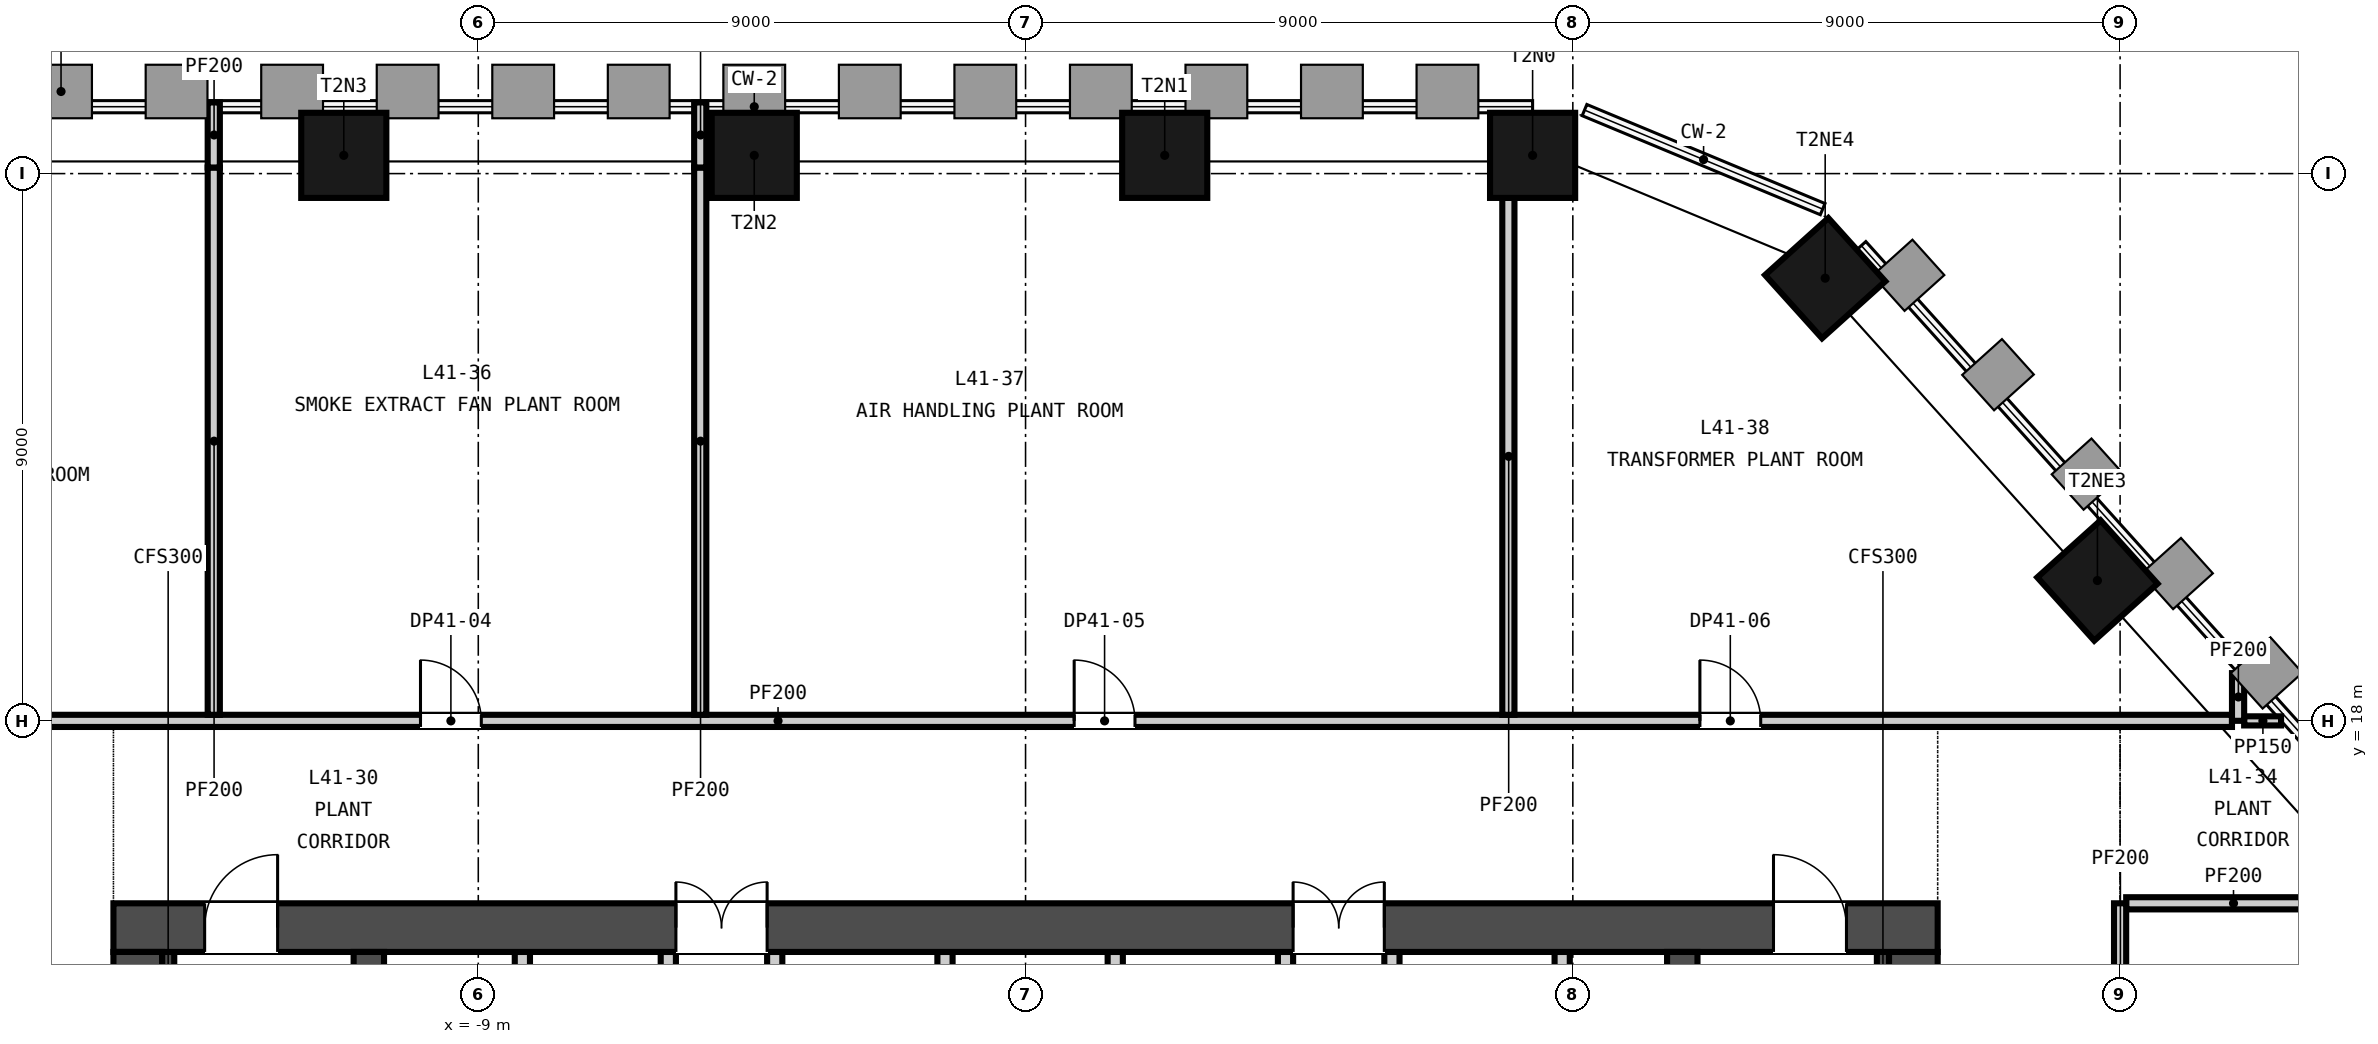
"""IFC4 building model, lengths in metres.
Left out: names, types, materials, properties, quantities, classifications, styles, units other than length and angle.
Written with IfcOpenShell. Run it as: python <this file> out.ifc"""

import sys

from ifc_helpers import new_model, si_unit, direction, frame, frame_2d, origin, origin_2d, place, context, subcontext, project, spatial, rectangle, extrude, element, fill, save


model = new_model("IFC4")
c1 = context("Model", 3, precision=1e-05, world=origin(), true_north=direction((0.0, 1.0)))
c2 = subcontext(c1, "Body", "Model", "MODEL_VIEW")
j1 = project(units=[si_unit("LENGTHUNIT", "METRE"), si_unit("PLANEANGLEUNIT", "RADIAN")], contexts=[c1])
p1 = place(None, origin())
s1 = spatial("IfcSite", under=j1, at=p1, CompositionType="ELEMENT")
p2 = place(p1, origin())
s2 = spatial("IfcBuilding", under=s1, at=p2, CompositionType="ELEMENT")
p3 = place(p2, frame((0.0, 0.0, 166.3)))
s3 = spatial("IfcBuildingStorey", under=s2, at=p3, CompositionType="ELEMENT", Elevation=166.3)
p4 = place(p3, frame((-15.0, 14.6, -0.3), z_axis=(0.0, 0.0, 1.0), x_axis=(1.0, 0.0, 0.0)))
e1 = element("IfcWall", 1, at=p4, inside=s3, PredefinedType="SOLIDWALL", context=c2, shape_type="SweptSolid", body=[
    extrude(rectangle(XDim=30.0, YDim=0.8, at=frame_2d((15.0, 0.0))), origin(), (0.0, 0.0, 1.0), 4.65),
])
p5 = place(p4, frame((9.25, 0.0, 0.3)))
e2 = element("IfcOpeningElement", 2, at=p5, cuts=e1, PredefinedType="OPENING", context=c2, shape_type="SweptSolid", body=[
    extrude(rectangle(XDim=1.5, YDim=2.1, at=frame_2d((0.75, 1.05))), frame((0.0, 0.41, 0.0), z_axis=(0.0, -1.0, 0.0), x_axis=(1.0, 0.0, 0.0)), (0.0, 0.0, 1.0), 0.82),
])
p6 = place(p4, frame((19.4, 0.0, 0.3)))
e3 = element("IfcOpeningElement", 3, at=p6, cuts=e1, PredefinedType="OPENING", context=c2, shape_type="SweptSolid", body=[
    extrude(rectangle(XDim=1.5, YDim=2.1, at=frame_2d((0.75, 1.05))), frame((0.0, 0.41, 0.0), z_axis=(0.0, -1.0, 0.0), x_axis=(1.0, 0.0, 0.0)), (0.0, 0.0, 1.0), 0.82),
])
p7 = place(p4, frame((1.5, 0.0, 0.3)))
e4 = element("IfcOpeningElement", 4, at=p7, cuts=e1, PredefinedType="OPENING", context=c2, shape_type="SweptSolid", body=[
    extrude(rectangle(XDim=1.2, YDim=2.1, at=frame_2d((0.6, 1.05))), frame((0.0, 0.41, 0.0), z_axis=(0.0, -1.0, 0.0), x_axis=(1.0, 0.0, 0.0)), (0.0, 0.0, 1.0), 0.82),
])
p8 = place(p4, frame((27.3, 0.0, 0.3)))
e5 = element("IfcOpeningElement", 5, at=p8, cuts=e1, PredefinedType="OPENING", context=c2, shape_type="SweptSolid", body=[
    extrude(rectangle(XDim=1.2, YDim=2.1, at=frame_2d((0.6, 1.05))), frame((0.0, 0.41, 0.0), z_axis=(0.0, -1.0, 0.0), x_axis=(1.0, 0.0, 0.0)), (0.0, 0.0, 1.0), 0.82),
])
for number, where, z_axis, x_axis in (
    (6, (-14.6, 0.8, -0.3), (0.0, 0.0, 1.0), (0.0, 1.0, 0.0)),
    (7, (14.6, 0.8, -0.3), (0.0, 0.0, 1.0), (0.0, 1.0, 0.0)),
):
    element("IfcWall", number, at=place(p3, frame(where, z_axis=z_axis, x_axis=x_axis)), inside=s3, PredefinedType="SOLIDWALL", context=c2, shape_type="SweptSolid", body=[
        extrude(rectangle(XDim=13.4, YDim=0.8, at=frame_2d((6.7, 0.0))), origin(), (0.0, 0.0, 1.0), 4.65),
    ])
for number, where, z_axis, x_axis in (
    (8, (-10.8, 0.8, -0.3), (0.0, 0.0, 1.0), (0.0, 1.0, 0.0)),
    (9, (10.8, 0.8, -0.3), (0.0, 0.0, 1.0), (0.0, 1.0, 0.0)),
):
    element("IfcWall", number, at=place(p3, frame(where, z_axis=z_axis, x_axis=x_axis)), inside=s3, PredefinedType="SOLIDWALL", context=c2, shape_type="SweptSolid", body=[
        extrude(rectangle(XDim=13.4, YDim=0.5, at=frame_2d((6.7, 0.0))), origin(), (0.0, 0.0, 1.0), 4.65),
    ])
for number, where, z_axis, x_axis in (
    (10, (8.339, 27.3, -0.3), (0.0, 0.0, 1.0), (-1.0, 0.0, 0.0)),
    (11, (2.288, 27.3, -0.3), (0.0, 0.0, 1.0), (-1.0, 0.0, 0.0)),
    (12, (-4.462, 27.3, -0.3), (0.0, 0.0, 1.0), (-1.0, 0.0, 0.0)),
    (13, (-11.212, 27.3, -0.3), (0.0, 0.0, 1.0), (-1.0, 0.0, 0.0)),
    (14, (17.627, 20.308, -0.3), (0.0, 0.0, 1.0), (-0.669, 0.743, 0.0)),
    (15, (13.15, 25.28, -0.3), (0.0, 0.0, 1.0), (-0.669, 0.743, 0.0)),
):
    element("IfcColumn", number, at=place(p3, frame(where, z_axis=z_axis, x_axis=x_axis)), inside=s3, PredefinedType="COLUMN", context=c2, shape_type="SweptSolid", body=[
        extrude(rectangle(XDim=1.4, YDim=1.4, at=origin_2d()), origin(), (0.0, 0.0, 1.0), 4.65),
    ])
for number, where, z_axis, x_axis in (
    (16, (-8.275, 11.3, 0.0), (0.0, 0.0, 1.0), (0.0, 1.0, 0.0)),
    (17, (-5.875, 11.3, 0.0), (0.0, 0.0, 1.0), (0.0, 1.0, 0.0)),
    (18, (-4.125, 11.3, 0.0), (0.0, 0.0, 1.0), (0.0, 1.0, 0.0)),
    (19, (-1.325, 11.3, 0.0), (0.0, 0.0, 1.0), (0.0, 1.0, 0.0)),
    (20, (1.475, 11.3, 0.0), (0.0, 0.0, 1.0), (0.0, 1.0, 0.0)),
    (21, (4.275, 11.3, 0.0), (0.0, 0.0, 1.0), (0.0, 1.0, 0.0)),
    (22, (6.025, 11.3, 0.0), (0.0, 0.0, 1.0), (0.0, 1.0, 0.0)),
    (23, (8.825, 11.3, 0.0), (0.0, 0.0, 1.0), (0.0, 1.0, 0.0)),
):
    element("IfcWall", number, at=place(p3, frame(where, z_axis=z_axis, x_axis=x_axis)), inside=s3, PredefinedType="PARTITIONING", context=c2, shape_type="SweptSolid", body=[
        extrude(rectangle(XDim=2.9, YDim=0.25, at=frame_2d((1.45, 0.0))), origin(), (0.0, 0.0, 1.0), 4.35),
    ])
for number, where, z_axis, x_axis in (
    (24, (-14.1, 0.8, 0.0), (0.0, 0.0, 1.0), (0.0, 1.0, 0.0)),
    (25, (14.1, 0.8, 0.0), (0.0, 0.0, 1.0), (0.0, 1.0, 0.0)),
):
    element("IfcWall", number, at=place(p3, frame(where, z_axis=z_axis, x_axis=x_axis)), inside=s3, PredefinedType="SOLIDWALL", context=c2, shape_type="SweptSolid", body=[
        extrude(rectangle(XDim=13.4, YDim=0.2, at=frame_2d((6.7, 0.0))), origin(), (0.0, 0.0, 1.0), 4.35),
    ])
p9 = place(p3, frame((18.1, 15.0, 0.0), z_axis=(0.0, 0.0, 1.0), x_axis=(1.0, 0.0, 0.0)))
e26 = element("IfcWall", 26, at=p9, inside=s3, PredefinedType="PARTITIONING", context=c2, shape_type="SweptSolid", body=[
    extrude(rectangle(XDim=3.52, YDim=0.2, at=frame_2d((1.76, 0.0))), origin(), (0.0, 0.0, 1.0), 4.35),
])
p10 = place(p3, frame((-22.003, 18.0, 0.0), z_axis=(0.0, 0.0, 1.0), x_axis=(1.0, 0.0, 0.0)))
e27 = element("IfcWall", 27, at=p10, inside=s3, PredefinedType="PARTITIONING", context=c2, shape_type="SweptSolid", body=[
    extrude(rectangle(XDim=41.843, YDim=0.2, at=frame_2d((20.921, 0.0))), origin(), (0.0, 0.0, 1.0), 4.35),
])
p11 = place(p10, frame((1.4, 0.0, 0.0)))
e28 = element("IfcOpeningElement", 28, at=p11, cuts=e27, PredefinedType="OPENING", context=c2, shape_type="SweptSolid", body=[
    extrude(rectangle(XDim=1.0, YDim=2.1, at=frame_2d((0.5, 1.05))), frame((0.0, 0.11, 0.0), z_axis=(0.0, -1.0, 0.0), x_axis=(1.0, 0.0, 0.0)), (0.0, 0.0, 1.0), 0.22),
])
p12 = place(p10, frame((12.052, 0.0, 0.0)))
e29 = element("IfcOpeningElement", 29, at=p12, cuts=e27, PredefinedType="OPENING", context=c2, shape_type="SweptSolid", body=[
    extrude(rectangle(XDim=1.0, YDim=2.1, at=frame_2d((0.5, 1.05))), frame((0.0, 0.11, 0.0), z_axis=(0.0, -1.0, 0.0), x_axis=(1.0, 0.0, 0.0)), (0.0, 0.0, 1.0), 0.22),
])
p13 = place(p10, frame((22.802, 0.0, 0.0)))
e30 = element("IfcOpeningElement", 30, at=p13, cuts=e27, PredefinedType="OPENING", context=c2, shape_type="SweptSolid", body=[
    extrude(rectangle(XDim=1.0, YDim=2.1, at=frame_2d((0.5, 1.05))), frame((0.0, 0.11, 0.0), z_axis=(0.0, -1.0, 0.0), x_axis=(1.0, 0.0, 0.0)), (0.0, 0.0, 1.0), 0.22),
])
p14 = place(p10, frame((33.092, 0.0, 0.0)))
e31 = element("IfcOpeningElement", 31, at=p14, cuts=e27, PredefinedType="OPENING", context=c2, shape_type="SweptSolid", body=[
    extrude(rectangle(XDim=1.0, YDim=2.1, at=frame_2d((0.5, 1.05))), frame((0.0, 0.11, 0.0), z_axis=(0.0, -1.0, 0.0), x_axis=(1.0, 0.0, 0.0)), (0.0, 0.0, 1.0), 0.22),
])
p15 = place(p3, frame((20.04, 18.0, 0.0), z_axis=(0.0, 0.0, 1.0), x_axis=(1.0, 0.0, 0.0)))
e32 = element("IfcWall", 32, at=p15, inside=s3, PredefinedType="PARTITIONING", context=c2, shape_type="SweptSolid", body=[
    extrude(rectangle(XDim=0.607, YDim=0.15, at=frame_2d((0.304, 0.0))), origin(), (0.0, 0.0, 1.0), 3.6),
])
p16 = place(p3, frame((-13.35, 18.1, 0.0), z_axis=(0.0, 0.0, 1.0), x_axis=(0.0, 1.0, 0.0)))
e33 = element("IfcWall", 33, at=p16, inside=s3, PredefinedType="PARTITIONING", context=c2, shape_type="SweptSolid", body=[
    extrude(rectangle(XDim=9.0, YDim=0.2, at=frame_2d((4.5, 0.0))), origin(), (0.0, 0.0, 1.0), 4.35),
])
p17 = place(p3, frame((-13.35, 27.1, 0.0), z_axis=(0.0, 0.0, 1.0), x_axis=(0.0, 1.0, 0.0)))
e34 = element("IfcWall", 34, at=p17, inside=s3, PredefinedType="PARTITIONING", context=c2, shape_type="SweptSolid", body=[
    extrude(rectangle(XDim=1.07, YDim=0.2, at=frame_2d((0.535, 0.0))), origin(), (0.0, 0.0, 1.0), 3.6),
])
p18 = place(p3, frame((-5.35, 18.1, 0.0), z_axis=(0.0, 0.0, 1.0), x_axis=(0.0, 1.0, 0.0)))
e35 = element("IfcWall", 35, at=p18, inside=s3, PredefinedType="PARTITIONING", context=c2, shape_type="SweptSolid", body=[
    extrude(rectangle(XDim=9.0, YDim=0.2, at=frame_2d((4.5, 0.0))), origin(), (0.0, 0.0, 1.0), 4.35),
])
p19 = place(p3, frame((-5.35, 27.1, 0.0), z_axis=(0.0, 0.0, 1.0), x_axis=(0.0, 1.0, 0.0)))
e36 = element("IfcWall", 36, at=p19, inside=s3, PredefinedType="PARTITIONING", context=c2, shape_type="SweptSolid", body=[
    extrude(rectangle(XDim=1.07, YDim=0.2, at=frame_2d((0.535, 0.0))), origin(), (0.0, 0.0, 1.0), 3.6),
])
p20 = place(p3, frame((7.94, 18.1, 0.0), z_axis=(0.0, 0.0, 1.0), x_axis=(0.0, 1.0, 0.0)))
e37 = element("IfcWall", 37, at=p20, inside=s3, PredefinedType="PARTITIONING", context=c2, shape_type="SweptSolid", body=[
    extrude(rectangle(XDim=8.5, YDim=0.2, at=frame_2d((4.25, 0.0))), origin(), (0.0, 0.0, 1.0), 3.671),
])
p21 = place(p3, frame((18.0, 0.0, 0.0), z_axis=(0.0, 0.0, 1.0), x_axis=(0.0, 1.0, 0.0)))
e38 = element("IfcWall", 38, at=p21, inside=s3, PredefinedType="PARTITIONING", context=c2, shape_type="SweptSolid", body=[
    extrude(rectangle(XDim=15.0, YDim=0.2, at=frame_2d((7.5, 0.0))), origin(), (0.0, 0.0, 1.0), 4.35),
])
p22 = place(p21, frame((6.9, 0.0, 0.0)))
e39 = element("IfcOpeningElement", 39, at=p22, cuts=e38, PredefinedType="OPENING", context=c2, shape_type="SweptSolid", body=[
    extrude(rectangle(XDim=1.0, YDim=2.1, at=frame_2d((0.5, 1.05))), frame((0.0, 0.11, 0.0), z_axis=(0.0, -1.0, 0.0), x_axis=(1.0, 0.0, 0.0)), (0.0, 0.0, 1.0), 0.22),
])
p23 = place(p3, frame((19.94, 18.001, 0.0), z_axis=(0.0, 0.0, 1.0), x_axis=(0.0, 1.0, 0.0)))
e40 = element("IfcWall", 40, at=p23, inside=s3, PredefinedType="PARTITIONING", context=c2, shape_type="SweptSolid", body=[
    extrude(rectangle(XDim=0.784, YDim=0.2, at=frame_2d((0.392, 0.0))), origin(), (0.0, 0.0, 1.0), 3.6),
])
p24 = place(p5, origin())
e41 = element("IfcDoor", 41, at=p24, inside=s3, OperationType="DOUBLE_DOOR_SINGLE_SWING", PredefinedType="DOOR", context=c2, shape_type="SweptSolid", body=[
    extrude(rectangle(XDim=1.5, YDim=2.1, at=frame_2d((0.75, 1.05))), frame((0.0, 0.025, 0.0), z_axis=(0.0, -1.0, 0.0), x_axis=(1.0, 0.0, 0.0)), (0.0, 0.0, 1.0), 0.05),
])
fill(e2, e41)
p25 = place(p6, origin())
e42 = element("IfcDoor", 42, at=p25, inside=s3, OperationType="DOUBLE_DOOR_SINGLE_SWING", PredefinedType="DOOR", context=c2, shape_type="SweptSolid", body=[
    extrude(rectangle(XDim=1.5, YDim=2.1, at=frame_2d((0.75, 1.05))), frame((0.0, 0.025, 0.0), z_axis=(0.0, -1.0, 0.0), x_axis=(1.0, 0.0, 0.0)), (0.0, 0.0, 1.0), 0.05),
])
fill(e3, e42)
p26 = place(p7, origin())
e43 = element("IfcDoor", 43, at=p26, inside=s3, OperationType="SINGLE_SWING_RIGHT", PredefinedType="DOOR", context=c2, shape_type="SweptSolid", body=[
    extrude(rectangle(XDim=1.2, YDim=2.1, at=frame_2d((0.6, 1.05))), frame((0.0, 0.025, 0.0), z_axis=(0.0, -1.0, 0.0), x_axis=(1.0, 0.0, 0.0)), (0.0, 0.0, 1.0), 0.05),
])
fill(e4, e43)
p27 = place(p8, origin())
e44 = element("IfcDoor", 44, at=p27, inside=s3, OperationType="SINGLE_SWING_LEFT", PredefinedType="DOOR", context=c2, shape_type="SweptSolid", body=[
    extrude(rectangle(XDim=1.2, YDim=2.1, at=frame_2d((0.6, 1.05))), frame((0.0, 0.025, 0.0), z_axis=(0.0, -1.0, 0.0), x_axis=(1.0, 0.0, 0.0)), (0.0, 0.0, 1.0), 0.05),
])
fill(e5, e44)
p28 = place(p12, origin())
e45 = element("IfcDoor", 45, at=p28, inside=s3, OperationType="SINGLE_SWING_LEFT", PredefinedType="DOOR", context=c2, shape_type="SweptSolid", body=[
    extrude(rectangle(XDim=1.0, YDim=2.1, at=frame_2d((0.5, 1.05))), frame((0.0, 0.025, 0.0), z_axis=(0.0, -1.0, 0.0), x_axis=(1.0, 0.0, 0.0)), (0.0, 0.0, 1.0), 0.05),
])
fill(e29, e45)
p29 = place(p13, origin())
e46 = element("IfcDoor", 46, at=p29, inside=s3, OperationType="SINGLE_SWING_LEFT", PredefinedType="DOOR", context=c2, shape_type="SweptSolid", body=[
    extrude(rectangle(XDim=1.0, YDim=2.1, at=frame_2d((0.5, 1.05))), frame((0.0, 0.025, 0.0), z_axis=(0.0, -1.0, 0.0), x_axis=(1.0, 0.0, 0.0)), (0.0, 0.0, 1.0), 0.05),
])
fill(e30, e46)
p30 = place(p14, origin())
e47 = element("IfcDoor", 47, at=p30, inside=s3, OperationType="SINGLE_SWING_LEFT", PredefinedType="DOOR", context=c2, shape_type="SweptSolid", body=[
    extrude(rectangle(XDim=1.0, YDim=2.1, at=frame_2d((0.5, 1.05))), frame((0.0, 0.025, 0.0), z_axis=(0.0, -1.0, 0.0), x_axis=(1.0, 0.0, 0.0)), (0.0, 0.0, 1.0), 0.05),
])
fill(e31, e47)
save(model, sys.argv[1])
